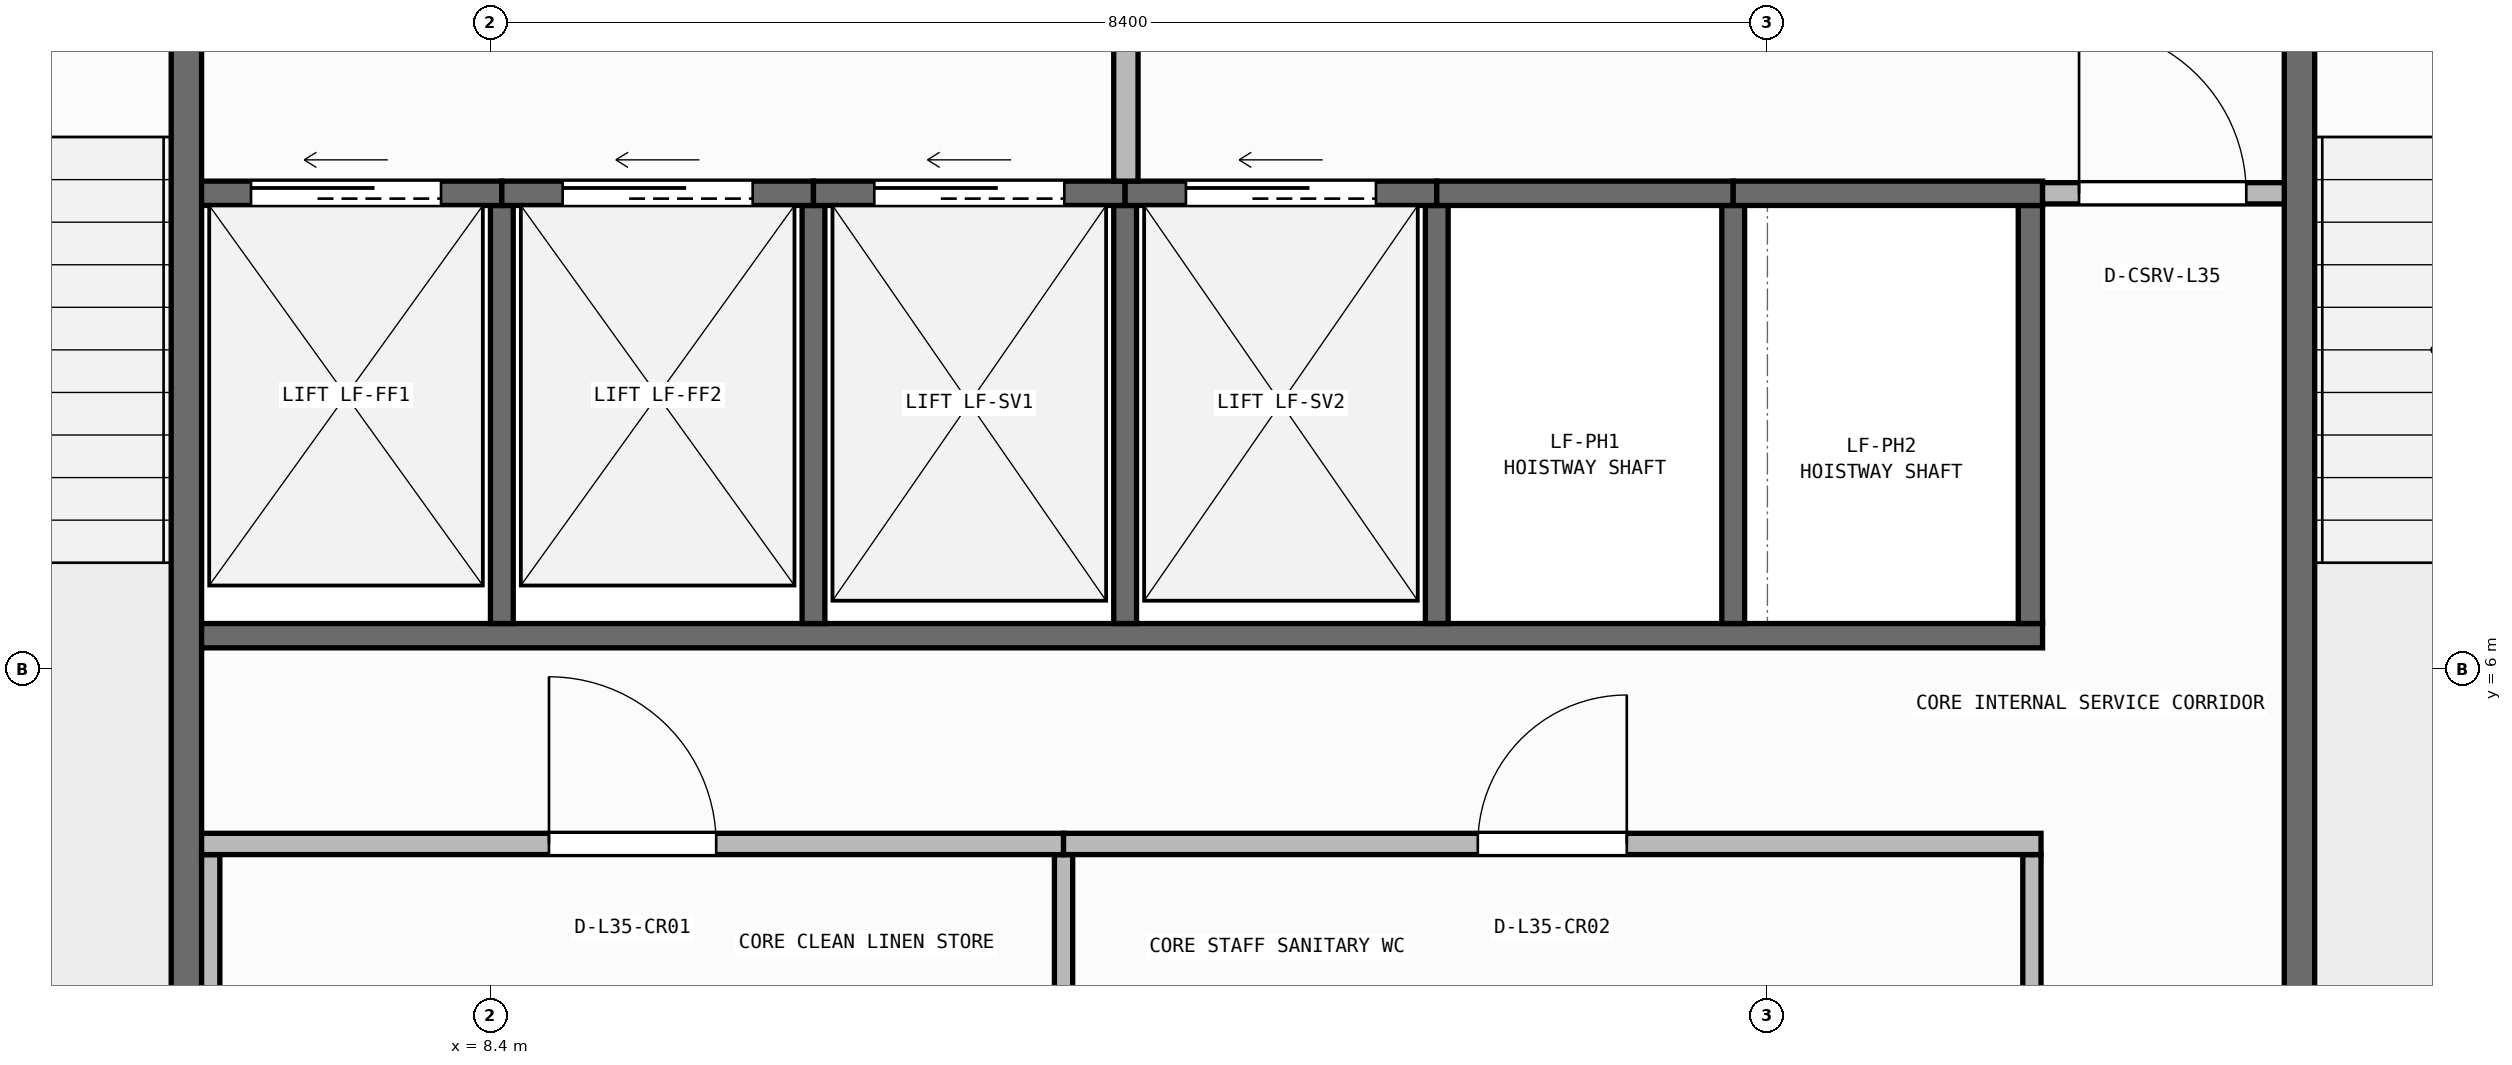
"""IFC4 building model, lengths in metres.
Left out: names, types, materials, properties, quantities, classifications, styles, units other than length and angle.
Written with IfcOpenShell. Run it as: python <this file> out.ifc"""

import sys

from ifc_helpers import new_model, si_unit, direction, frame, frame_2d, origin, place, context, subcontext, project, spatial, rectangle, extrude, element, fill, save


model = new_model("IFC4")
c1 = context("Model", 3, precision=1e-05, world=origin(), true_north=direction((0.0, 1.0)))
c2 = subcontext(c1, "Body", "Model", "MODEL_VIEW")
j1 = project(units=[si_unit("LENGTHUNIT", "METRE"), si_unit("PLANEANGLEUNIT", "RADIAN")], contexts=[c1])
p1 = place(None, origin())
s1 = spatial("IfcSite", under=j1, at=p1, CompositionType="ELEMENT")
p2 = place(p1, origin())
s2 = spatial("IfcBuilding", under=s1, at=p2, CompositionType="ELEMENT")
p3 = place(p2, frame((0.0, 0.0, 142.85)))
s3 = spatial("IfcBuildingStorey", under=s2, at=p3, CompositionType="ELEMENT", Elevation=142.85)
p4 = place(p3, frame((2.76, 0.173, 0.0), z_axis=(0.0, 0.0, 1.0), x_axis=(0.996857931723, 0.079210251617, 0.0)))
e1 = element("IfcWall", 1, at=p4, inside=s3, PredefinedType="STANDARD", context=c2, shape_type="SweptSolid", body=[
    extrude(rectangle(XDim=51.442, YDim=0.26, at=frame_2d((25.721, 0.0))), origin(), (0.0, 0.0, 1.0), 3.71),
])
p5 = place(p4, frame((24.521, 0.0, 0.9)))
e2 = element("IfcOpeningElement", 2, at=p5, cuts=e1, PredefinedType="OPENING", context=c2, shape_type="SweptSolid", body=[
    extrude(rectangle(XDim=2.4, YDim=1.65, at=frame_2d((1.2, 0.825))), frame((0.0, 0.14, 0.0), z_axis=(0.0, -1.0, 0.0), x_axis=(1.0, 0.0, 0.0)), (0.0, 0.0, 1.0), 0.28),
])
for number, where, z_axis, x_axis in (
    (3, (6.4, 3.5, 0.0), (0.0, 0.0, 1.0), (0.0, 1.0, 0.0)),
    (4, (20.3, 3.5, 0.0), (0.0, 0.0, 1.0), (0.0, 1.0, 0.0)),
):
    element("IfcWall", number, at=place(p3, frame(where, z_axis=z_axis, x_axis=x_axis)), inside=s3, PredefinedType="SHEAR", context=c2, shape_type="SweptSolid", body=[
        extrude(rectangle(XDim=7.6, YDim=0.2, at=frame_2d((3.8, 0.0))), origin(), (0.0, 0.0, 1.0), 3.71),
    ])
p6 = place(p3, frame((6.5, 6.22, 0.0), z_axis=(0.0, 0.0, 1.0), x_axis=(1.0, 0.0, 0.0)))
e5 = element("IfcWall", 5, at=p6, inside=s3, PredefinedType="SHEAR", context=c2, shape_type="SweptSolid", body=[
    extrude(rectangle(XDim=12.11, YDim=0.16, at=frame_2d((6.055, 0.0))), origin(), (0.0, 0.0, 1.0), 3.71),
])
p7 = place(p3, frame((18.53, 6.3, 0.0), z_axis=(0.0, 0.0, 1.0), x_axis=(0.0, 1.0, 0.0)))
e6 = element("IfcWall", 6, at=p7, inside=s3, PredefinedType="SHEAR", context=c2, shape_type="SweptSolid", body=[
    extrude(rectangle(XDim=2.75, YDim=0.16, at=frame_2d((1.375, 0.0))), origin(), (0.0, 0.0, 1.0), 3.71),
])
for number, where, z_axis, x_axis in (
    (7, (8.475, 6.3, 0.0), (0.0, 0.0, 1.0), (0.0, 1.0, 0.0)),
    (8, (10.525, 6.3, 0.0), (0.0, 0.0, 1.0), (0.0, 1.0, 0.0)),
    (9, (12.575, 6.3, 0.0), (0.0, 0.0, 1.0), (0.0, 1.0, 0.0)),
    (10, (14.625, 6.3, 0.0), (0.0, 0.0, 1.0), (0.0, 1.0, 0.0)),
    (11, (16.575, 6.3, 0.0), (0.0, 0.0, 1.0), (0.0, 1.0, 0.0)),
):
    element("IfcWall", number, at=place(p3, frame(where, z_axis=z_axis, x_axis=x_axis)), inside=s3, PredefinedType="SHEAR", context=c2, shape_type="SweptSolid", body=[
        extrude(rectangle(XDim=2.75, YDim=0.15, at=frame_2d((1.375, 0.0))), origin(), (0.0, 0.0, 1.0), 3.71),
    ])
p8 = place(p3, frame((6.5, 9.13, 0.0), z_axis=(0.0, 0.0, 1.0), x_axis=(1.0, 0.0, 0.0)))
e12 = element("IfcWall", 12, at=p8, inside=s3, PredefinedType="SHEAR", context=c2, shape_type="SweptSolid", body=[
    extrude(rectangle(XDim=1.975, YDim=0.16, at=frame_2d((0.988, 0.0))), origin(), (0.0, 0.0, 1.0), 3.71),
])
p9 = place(p8, frame((0.325, 0.0, 0.0)))
e13 = element("IfcOpeningElement", 13, at=p9, cuts=e12, PredefinedType="OPENING", context=c2, shape_type="SweptSolid", body=[
    extrude(rectangle(XDim=1.25, YDim=2.15, at=frame_2d((0.625, 1.075))), frame((0.0, 0.09, 0.0), z_axis=(0.0, -1.0, 0.0), x_axis=(1.0, 0.0, 0.0)), (0.0, 0.0, 1.0), 0.18),
])
p10 = place(p3, frame((8.475, 9.13, 0.0), z_axis=(0.0, 0.0, 1.0), x_axis=(1.0, 0.0, 0.0)))
e14 = element("IfcWall", 14, at=p10, inside=s3, PredefinedType="SHEAR", context=c2, shape_type="SweptSolid", body=[
    extrude(rectangle(XDim=2.05, YDim=0.16, at=frame_2d((1.025, 0.0))), origin(), (0.0, 0.0, 1.0), 3.71),
])
p11 = place(p10, frame((0.4, 0.0, 0.0)))
e15 = element("IfcOpeningElement", 15, at=p11, cuts=e14, PredefinedType="OPENING", context=c2, shape_type="SweptSolid", body=[
    extrude(rectangle(XDim=1.25, YDim=2.15, at=frame_2d((0.625, 1.075))), frame((0.0, 0.09, 0.0), z_axis=(0.0, -1.0, 0.0), x_axis=(1.0, 0.0, 0.0)), (0.0, 0.0, 1.0), 0.18),
])
p12 = place(p3, frame((10.525, 9.13, 0.0), z_axis=(0.0, 0.0, 1.0), x_axis=(1.0, 0.0, 0.0)))
e16 = element("IfcWall", 16, at=p12, inside=s3, PredefinedType="SHEAR", context=c2, shape_type="SweptSolid", body=[
    extrude(rectangle(XDim=2.05, YDim=0.16, at=frame_2d((1.025, 0.0))), origin(), (0.0, 0.0, 1.0), 3.71),
])
p13 = place(p12, frame((0.4, 0.0, 0.0)))
e17 = element("IfcOpeningElement", 17, at=p13, cuts=e16, PredefinedType="OPENING", context=c2, shape_type="SweptSolid", body=[
    extrude(rectangle(XDim=1.25, YDim=2.15, at=frame_2d((0.625, 1.075))), frame((0.0, 0.09, 0.0), z_axis=(0.0, -1.0, 0.0), x_axis=(1.0, 0.0, 0.0)), (0.0, 0.0, 1.0), 0.18),
])
p14 = place(p3, frame((12.575, 9.13, 0.0), z_axis=(0.0, 0.0, 1.0), x_axis=(1.0, 0.0, 0.0)))
e18 = element("IfcWall", 18, at=p14, inside=s3, PredefinedType="SHEAR", context=c2, shape_type="SweptSolid", body=[
    extrude(rectangle(XDim=2.05, YDim=0.16, at=frame_2d((1.025, 0.0))), origin(), (0.0, 0.0, 1.0), 3.71),
])
p15 = place(p14, frame((0.4, 0.0, 0.0)))
e19 = element("IfcOpeningElement", 19, at=p15, cuts=e18, PredefinedType="OPENING", context=c2, shape_type="SweptSolid", body=[
    extrude(rectangle(XDim=1.25, YDim=2.15, at=frame_2d((0.625, 1.075))), frame((0.0, 0.09, 0.0), z_axis=(0.0, -1.0, 0.0), x_axis=(1.0, 0.0, 0.0)), (0.0, 0.0, 1.0), 0.18),
])
p16 = place(p3, frame((14.625, 9.13, 0.0), z_axis=(0.0, 0.0, 1.0), x_axis=(1.0, 0.0, 0.0)))
e20 = element("IfcWall", 20, at=p16, inside=s3, PredefinedType="SHEAR", context=c2, shape_type="SweptSolid", body=[
    extrude(rectangle(XDim=1.95, YDim=0.16, at=frame_2d((0.975, 0.0))), origin(), (0.0, 0.0, 1.0), 3.71),
])
p17 = place(p3, frame((16.575, 9.13, 0.0), z_axis=(0.0, 0.0, 1.0), x_axis=(1.0, 0.0, 0.0)))
e21 = element("IfcWall", 21, at=p17, inside=s3, PredefinedType="SHEAR", context=c2, shape_type="SweptSolid", body=[
    extrude(rectangle(XDim=2.035, YDim=0.16, at=frame_2d((1.018, 0.0))), origin(), (0.0, 0.0, 1.0), 3.71),
])
for number, where, z_axis, x_axis in (
    (22, (6.56, 3.52, 0.0), (0.0, 0.0, 1.0), (0.0, 1.0, 0.0)),
    (23, (12.17, 3.52, 0.0), (0.0, 0.0, 1.0), (0.0, 1.0, 0.0)),
    (24, (18.54, 3.52, 0.0), (0.0, 0.0, 1.0), (0.0, 1.0, 0.0)),
):
    element("IfcWall", number, at=place(p3, frame(where, z_axis=z_axis, x_axis=x_axis)), inside=s3, PredefinedType="PARTITIONING", context=c2, shape_type="SweptSolid", body=[
        extrude(rectangle(XDim=1.26, YDim=0.12, at=frame_2d((0.63, 0.0))), origin(), (0.0, 0.0, 1.0), 3.71),
    ])
p18 = place(p3, frame((6.5, 4.85, 0.0), z_axis=(0.0, 0.0, 1.0), x_axis=(1.0, 0.0, 0.0)))
e25 = element("IfcWall", 25, at=p18, inside=s3, PredefinedType="PARTITIONING", context=c2, shape_type="SweptSolid", body=[
    extrude(rectangle(XDim=5.67, YDim=0.14, at=frame_2d((2.835, 0.0))), origin(), (0.0, 0.0, 1.0), 3.71),
])
p19 = place(p18, frame((2.285, 0.0, 0.0)))
e26 = element("IfcOpeningElement", 26, at=p19, cuts=e25, PredefinedType="OPENING", context=c2, shape_type="SweptSolid", body=[
    extrude(rectangle(XDim=1.1, YDim=2.1, at=frame_2d((0.55, 1.05))), frame((0.0, 0.08, 0.0), z_axis=(0.0, -1.0, 0.0), x_axis=(1.0, 0.0, 0.0)), (0.0, 0.0, 1.0), 0.16),
])
p20 = place(p3, frame((12.17, 4.85, 0.0), z_axis=(0.0, 0.0, 1.0), x_axis=(1.0, 0.0, 0.0)))
e27 = element("IfcWall", 27, at=p20, inside=s3, PredefinedType="PARTITIONING", context=c2, shape_type="SweptSolid", body=[
    extrude(rectangle(XDim=6.43, YDim=0.14, at=frame_2d((3.215, 0.0))), origin(), (0.0, 0.0, 1.0), 3.71),
])
p21 = place(p20, frame((2.725, 0.0, 0.0)))
e28 = element("IfcOpeningElement", 28, at=p21, cuts=e27, PredefinedType="OPENING", context=c2, shape_type="SweptSolid", body=[
    extrude(rectangle(XDim=0.98, YDim=2.1, at=frame_2d((0.49, 1.05))), frame((0.0, 0.08, 0.0), z_axis=(0.0, -1.0, 0.0), x_axis=(1.0, 0.0, 0.0)), (0.0, 0.0, 1.0), 0.16),
])
p22 = place(p3, frame((18.61, 9.13, 0.0), z_axis=(0.0, 0.0, 1.0), x_axis=(1.0, 0.0, 0.0)))
e29 = element("IfcWall", 29, at=p22, inside=s3, PredefinedType="PARTITIONING", context=c2, shape_type="SweptSolid", body=[
    extrude(rectangle(XDim=1.59, YDim=0.14, at=frame_2d((0.795, 0.0))), origin(), (0.0, 0.0, 1.0), 3.71),
])
p23 = place(p22, frame((0.24, 0.0, 0.0)))
e30 = element("IfcOpeningElement", 30, at=p23, cuts=e29, PredefinedType="OPENING", context=c2, shape_type="SweptSolid", body=[
    extrude(rectangle(XDim=1.1, YDim=2.1, at=frame_2d((0.55, 1.05))), frame((0.0, 0.08, 0.0), z_axis=(0.0, -1.0, 0.0), x_axis=(1.0, 0.0, 0.0)), (0.0, 0.0, 1.0), 0.16),
])
p24 = place(p3, frame((12.58, 9.21, 0.0), z_axis=(0.0, 0.0, 1.0), x_axis=(0.0, 1.0, 0.0)))
e31 = element("IfcWall", 31, at=p24, inside=s3, PredefinedType="PARTITIONING", context=c2, shape_type="SweptSolid", body=[
    extrude(rectangle(XDim=2.79, YDim=0.16, at=frame_2d((1.395, 0.0))), origin(), (0.0, 0.0, 1.0), 3.71),
])
p25 = place(p9, origin())
e32 = element("IfcDoor", 32, at=p25, inside=s3, OperationType="SLIDING_TO_LEFT", PredefinedType="DOOR", context=c2, shape_type="SweptSolid", body=[
    extrude(rectangle(XDim=1.25, YDim=2.15, at=frame_2d((0.625, 1.075))), frame((0.0, 0.025, 0.0), z_axis=(0.0, -1.0, 0.0), x_axis=(1.0, 0.0, 0.0)), (0.0, 0.0, 1.0), 0.05),
])
fill(e13, e32)
p26 = place(p11, origin())
e33 = element("IfcDoor", 33, at=p26, inside=s3, OperationType="SLIDING_TO_LEFT", PredefinedType="DOOR", context=c2, shape_type="SweptSolid", body=[
    extrude(rectangle(XDim=1.25, YDim=2.15, at=frame_2d((0.625, 1.075))), frame((0.0, 0.025, 0.0), z_axis=(0.0, -1.0, 0.0), x_axis=(1.0, 0.0, 0.0)), (0.0, 0.0, 1.0), 0.05),
])
fill(e15, e33)
p27 = place(p13, origin())
e34 = element("IfcDoor", 34, at=p27, inside=s3, OperationType="SLIDING_TO_LEFT", PredefinedType="DOOR", context=c2, shape_type="SweptSolid", body=[
    extrude(rectangle(XDim=1.25, YDim=2.15, at=frame_2d((0.625, 1.075))), frame((0.0, 0.025, 0.0), z_axis=(0.0, -1.0, 0.0), x_axis=(1.0, 0.0, 0.0)), (0.0, 0.0, 1.0), 0.05),
])
fill(e17, e34)
p28 = place(p15, origin())
e35 = element("IfcDoor", 35, at=p28, inside=s3, OperationType="SLIDING_TO_LEFT", PredefinedType="DOOR", context=c2, shape_type="SweptSolid", body=[
    extrude(rectangle(XDim=1.25, YDim=2.15, at=frame_2d((0.625, 1.075))), frame((0.0, 0.025, 0.0), z_axis=(0.0, -1.0, 0.0), x_axis=(1.0, 0.0, 0.0)), (0.0, 0.0, 1.0), 0.05),
])
fill(e19, e35)
p29 = place(p19, origin())
e36 = element("IfcDoor", 36, at=p29, inside=s3, OperationType="SINGLE_SWING_LEFT", PredefinedType="DOOR", context=c2, shape_type="SweptSolid", body=[
    extrude(rectangle(XDim=1.1, YDim=2.1, at=frame_2d((0.55, 1.05))), frame((0.0, 0.025, 0.0), z_axis=(0.0, -1.0, 0.0), x_axis=(1.0, 0.0, 0.0)), (0.0, 0.0, 1.0), 0.05),
])
fill(e26, e36)
p30 = place(p21, origin())
e37 = element("IfcDoor", 37, at=p30, inside=s3, OperationType="SINGLE_SWING_RIGHT", PredefinedType="DOOR", context=c2, shape_type="SweptSolid", body=[
    extrude(rectangle(XDim=0.98, YDim=2.1, at=frame_2d((0.49, 1.05))), frame((0.0, 0.025, 0.0), z_axis=(0.0, -1.0, 0.0), x_axis=(1.0, 0.0, 0.0)), (0.0, 0.0, 1.0), 0.05),
])
fill(e28, e37)
p31 = place(p23, origin())
e38 = element("IfcDoor", 38, at=p31, inside=s3, OperationType="SINGLE_SWING_LEFT", PredefinedType="DOOR", context=c2, shape_type="SweptSolid", body=[
    extrude(rectangle(XDim=1.1, YDim=2.1, at=frame_2d((0.55, 1.05))), frame((0.0, 0.025, 0.0), z_axis=(0.0, -1.0, 0.0), x_axis=(1.0, 0.0, 0.0)), (0.0, 0.0, 1.0), 0.05),
])
fill(e30, e38)
save(model, sys.argv[1])
